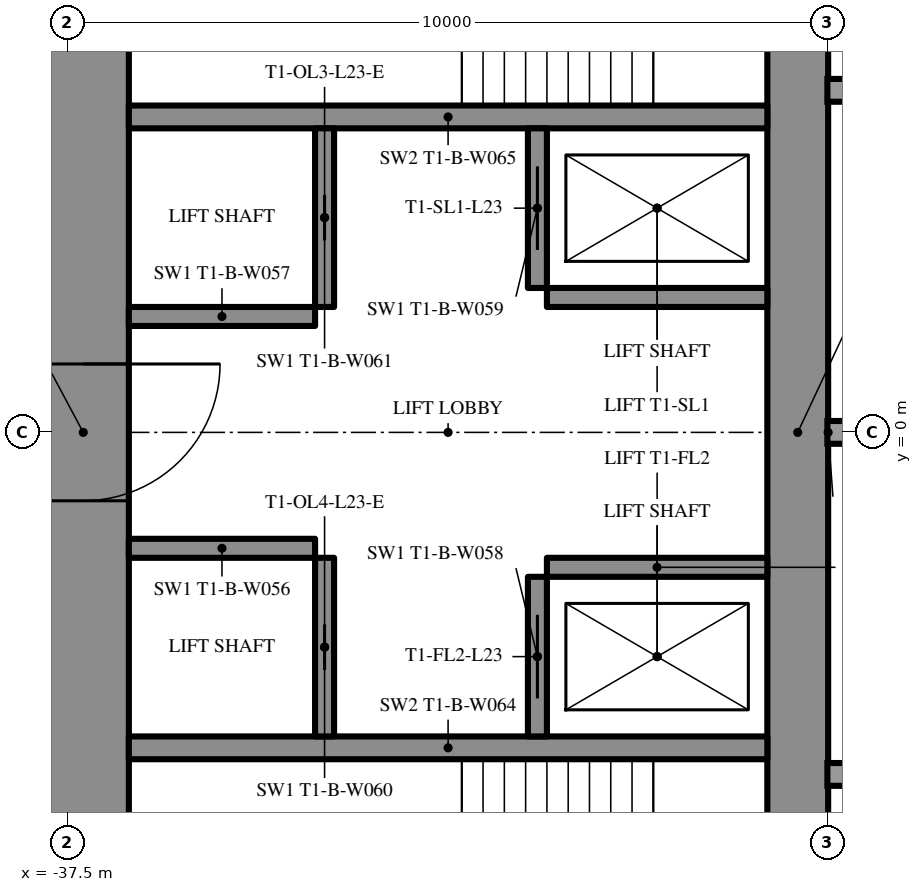
"""IFC4 building model, lengths in metres.
Left out: names, types, materials, properties, quantities, classifications, styles, units other than length and angle.
Written with IfcOpenShell. Run it as: python <this file> out.ifc"""

import sys

from ifc_helpers import new_model, si_unit, direction, frame, frame_2d, origin, place, context, subcontext, project, spatial, rectangle, extrude, element, fill, save


model = new_model("IFC4")
c1 = context("Model", 3, precision=1e-05, world=origin(), true_north=direction((0.0, 1.0)))
c2 = subcontext(c1, "Body", "Model", "MODEL_VIEW")
j1 = project(units=[si_unit("LENGTHUNIT", "METRE"), si_unit("PLANEANGLEUNIT", "RADIAN")], contexts=[c1])
p1 = place(None, origin())
s1 = spatial("IfcSite", under=j1, at=p1, CompositionType="ELEMENT")
p2 = place(p1, origin())
s2 = spatial("IfcBuilding", under=s1, at=p2, CompositionType="ELEMENT")
p3 = place(p2, frame((0.0, 0.0, 90.6)))
s3 = spatial("IfcBuildingStorey", under=s2, at=p3, CompositionType="ELEMENT", Elevation=90.6)
p4 = place(p3, frame((-27.9, 8.6, 0.0), z_axis=(0.0, 0.0, 1.0), x_axis=(0.0, -1.0, 0.0)))
e1 = element("IfcWall", 1, at=p4, inside=s3, PredefinedType="SHEAR", context=c2, shape_type="SweptSolid", body=[
    extrude(rectangle(XDim=17.2, YDim=0.8, at=frame_2d((8.6, 0.0))), origin(), (0.0, 0.0, 1.0), 3.5),
])
p5 = place(p4, frame((2.45, 0.0, 0.6)))
e2 = element("IfcOpeningElement", 2, at=p5, cuts=e1, PredefinedType="OPENING", context=c2, shape_type="SweptSolid", body=[
    extrude(rectangle(XDim=0.6, YDim=2.1, at=frame_2d((0.3, 1.05))), frame((0.0, 0.41, 0.0), z_axis=(0.0, -1.0, 0.0), x_axis=(1.0, 0.0, 0.0)), (0.0, 0.0, 1.0), 0.82),
])
p6 = place(p4, frame((14.15, 0.0, 0.6)))
e3 = element("IfcOpeningElement", 3, at=p6, cuts=e1, PredefinedType="OPENING", context=c2, shape_type="SweptSolid", body=[
    extrude(rectangle(XDim=0.6, YDim=2.1, at=frame_2d((0.3, 1.05))), frame((0.0, 0.41, 0.0), z_axis=(0.0, -1.0, 0.0), x_axis=(1.0, 0.0, 0.0)), (0.0, 0.0, 1.0), 0.82),
])
p7 = place(p3, frame((-37.3, 8.6, 0.0), z_axis=(0.0, 0.0, 1.0), x_axis=(0.0, -1.0, 0.0)))
e4 = element("IfcWall", 4, at=p7, inside=s3, PredefinedType="SHEAR", context=c2, shape_type="SweptSolid", body=[
    extrude(rectangle(XDim=17.2, YDim=1.2, at=frame_2d((8.6, 0.0))), origin(), (0.0, 0.0, 1.0), 3.5),
])
p8 = place(p7, frame((7.7, 0.0, 0.0)))
e5 = element("IfcOpeningElement", 5, at=p8, cuts=e4, PredefinedType="OPENING", context=c2, shape_type="SweptSolid", body=[
    extrude(rectangle(XDim=1.8, YDim=2.2, at=frame_2d((0.9, 1.1))), frame((0.0, 0.61, 0.0), z_axis=(0.0, -1.0, 0.0), x_axis=(1.0, 0.0, 0.0)), (0.0, 0.0, 1.0), 1.22),
])
for number, where, z_axis, x_axis in (
    (6, (-28.3, 4.15, 0.0), (0.0, 0.0, 1.0), (-1.0, 0.0, 0.0)),
    (7, (-28.3, -4.15, 0.0), (0.0, 0.0, 1.0), (-1.0, 0.0, 0.0)),
):
    element("IfcWall", number, at=place(p3, frame(where, z_axis=z_axis, x_axis=x_axis)), inside=s3, PredefinedType="SHEAR", context=c2, shape_type="SweptSolid", body=[
        extrude(rectangle(XDim=8.4, YDim=0.3, at=frame_2d((4.2, 0.0))), origin(), (0.0, 0.0, 1.0), 3.5),
    ])
p9 = place(p3, frame((-31.325, 4.0, 0.0), z_axis=(0.0, 0.0, 1.0), x_axis=(0.0, -1.0, 0.0)))
e8 = element("IfcWall", 8, at=p9, inside=s3, PredefinedType="SHEAR", context=c2, shape_type="SweptSolid", body=[
    extrude(rectangle(XDim=2.1, YDim=0.25, at=frame_2d((1.05, 0.0))), origin(), (0.0, 0.0, 1.0), 3.5),
])
p10 = place(p9, frame((0.5, 0.0, 0.0)))
e9 = element("IfcOpeningElement", 9, at=p10, cuts=e8, PredefinedType="OPENING", context=c2, shape_type="SweptSolid", body=[
    extrude(rectangle(XDim=1.1, YDim=2.2, at=frame_2d((0.55, 1.1))), frame((0.0, 0.135, 0.0), z_axis=(0.0, -1.0, 0.0), x_axis=(1.0, 0.0, 0.0)), (0.0, 0.0, 1.0), 0.27),
])
p11 = place(p3, frame((-34.125, 4.0, 0.0), z_axis=(0.0, 0.0, 1.0), x_axis=(0.0, -1.0, 0.0)))
e10 = element("IfcWall", 10, at=p11, inside=s3, PredefinedType="SHEAR", context=c2, shape_type="SweptSolid", body=[
    extrude(rectangle(XDim=2.35, YDim=0.25, at=frame_2d((1.175, 0.0))), origin(), (0.0, 0.0, 1.0), 3.5),
])
p12 = place(p11, frame((0.875, 0.0, 0.0)))
e11 = element("IfcOpeningElement", 11, at=p12, cuts=e10, PredefinedType="OPENING", context=c2, shape_type="SweptSolid", body=[
    extrude(rectangle(XDim=0.6, YDim=2.0, at=frame_2d((0.3, 1.0))), frame((0.0, 0.135, 0.0), z_axis=(0.0, -1.0, 0.0), x_axis=(1.0, 0.0, 0.0)), (0.0, 0.0, 1.0), 0.27),
])
p13 = place(p3, frame((-28.3, 1.775, 0.0), z_axis=(0.0, 0.0, 1.0), x_axis=(-1.0, 0.0, 0.0)))
e12 = element("IfcWall", 12, at=p13, inside=s3, PredefinedType="SHEAR", context=c2, shape_type="SweptSolid", body=[
    extrude(rectangle(XDim=2.9, YDim=0.25, at=frame_2d((1.45, 0.0))), origin(), (0.0, 0.0, 1.0), 3.5),
])
p14 = place(p3, frame((-34.25, 1.525, 0.0), z_axis=(0.0, 0.0, 1.0), x_axis=(-1.0, 0.0, 0.0)))
e13 = element("IfcWall", 13, at=p14, inside=s3, PredefinedType="SHEAR", context=c2, shape_type="SweptSolid", body=[
    extrude(rectangle(XDim=2.45, YDim=0.25, at=frame_2d((1.225, 0.0))), origin(), (0.0, 0.0, 1.0), 3.5),
])
p15 = place(p3, frame((-31.325, -1.9, 0.0), z_axis=(0.0, 0.0, 1.0), x_axis=(0.0, -1.0, 0.0)))
e14 = element("IfcWall", 14, at=p15, inside=s3, PredefinedType="SHEAR", context=c2, shape_type="SweptSolid", body=[
    extrude(rectangle(XDim=2.1, YDim=0.25, at=frame_2d((1.05, 0.0))), origin(), (0.0, 0.0, 1.0), 3.5),
])
p16 = place(p15, frame((0.5, 0.0, 0.0)))
e15 = element("IfcOpeningElement", 15, at=p16, cuts=e14, PredefinedType="OPENING", context=c2, shape_type="SweptSolid", body=[
    extrude(rectangle(XDim=1.1, YDim=2.2, at=frame_2d((0.55, 1.1))), frame((0.0, 0.135, 0.0), z_axis=(0.0, -1.0, 0.0), x_axis=(1.0, 0.0, 0.0)), (0.0, 0.0, 1.0), 0.27),
])
p17 = place(p3, frame((-34.125, -1.65, 0.0), z_axis=(0.0, 0.0, 1.0), x_axis=(0.0, -1.0, 0.0)))
e16 = element("IfcWall", 16, at=p17, inside=s3, PredefinedType="SHEAR", context=c2, shape_type="SweptSolid", body=[
    extrude(rectangle(XDim=2.35, YDim=0.25, at=frame_2d((1.175, 0.0))), origin(), (0.0, 0.0, 1.0), 3.5),
])
p18 = place(p17, frame((0.875, 0.0, 0.0)))
e17 = element("IfcOpeningElement", 17, at=p18, cuts=e16, PredefinedType="OPENING", context=c2, shape_type="SweptSolid", body=[
    extrude(rectangle(XDim=0.6, YDim=2.0, at=frame_2d((0.3, 1.0))), frame((0.0, 0.135, 0.0), z_axis=(0.0, -1.0, 0.0), x_axis=(1.0, 0.0, 0.0)), (0.0, 0.0, 1.0), 0.27),
])
p19 = place(p3, frame((-28.3, -1.775, 0.0), z_axis=(0.0, 0.0, 1.0), x_axis=(-1.0, 0.0, 0.0)))
e18 = element("IfcWall", 18, at=p19, inside=s3, PredefinedType="SHEAR", context=c2, shape_type="SweptSolid", body=[
    extrude(rectangle(XDim=2.9, YDim=0.25, at=frame_2d((1.45, 0.0))), origin(), (0.0, 0.0, 1.0), 3.5),
])
p20 = place(p3, frame((-34.25, -1.525, 0.0), z_axis=(0.0, 0.0, 1.0), x_axis=(-1.0, 0.0, 0.0)))
e19 = element("IfcWall", 19, at=p20, inside=s3, PredefinedType="SHEAR", context=c2, shape_type="SweptSolid", body=[
    extrude(rectangle(XDim=2.45, YDim=0.25, at=frame_2d((1.225, 0.0))), origin(), (0.0, 0.0, 1.0), 3.5),
])
p21 = place(p3, frame((-27.2, 14.3, 0.0), z_axis=(0.0, 0.0, 1.0), x_axis=(-0.866026593062, -0.499997940104, 0.0)))
e20 = element("IfcWall", 20, at=p21, inside=s3, PredefinedType="SHEAR", context=c2, shape_type="SweptSolid", body=[
    extrude(rectangle(XDim=28.946, YDim=1.2, at=frame_2d((14.473, 0.0))), origin(), (0.0, 0.0, 1.0), 3.5),
])
p22 = place(p21, frame((4.6, 0.0, 0.0)))
e21 = element("IfcOpeningElement", 21, at=p22, cuts=e20, PredefinedType="OPENING", context=c2, shape_type="SweptSolid", body=[
    extrude(rectangle(XDim=1.0, YDim=2.2, at=frame_2d((0.5, 1.1))), frame((0.0, 0.61, 0.0), z_axis=(0.0, -1.0, 0.0), x_axis=(1.0, 0.0, 0.0)), (0.0, 0.0, 1.0), 1.22),
])
p23 = place(p21, frame((13.395, 0.0, 0.0)))
e22 = element("IfcOpeningElement", 22, at=p23, cuts=e20, PredefinedType="OPENING", context=c2, shape_type="SweptSolid", body=[
    extrude(rectangle(XDim=1.8, YDim=2.2, at=frame_2d((0.9, 1.1))), frame((0.0, 0.61, 0.0), z_axis=(0.0, -1.0, 0.0), x_axis=(1.0, 0.0, 0.0)), (0.0, 0.0, 1.0), 1.22),
])
p24 = place(p3, frame((-27.2, -14.3, 0.0), z_axis=(0.0, 0.0, 1.0), x_axis=(-0.866024021859, 0.500002393557, 0.0)))
e23 = element("IfcWall", 23, at=p24, inside=s3, PredefinedType="SHEAR", context=c2, shape_type="SweptSolid", body=[
    extrude(rectangle(XDim=27.907, YDim=1.2, at=frame_2d((13.954, 0.0))), origin(), (0.0, 0.0, 1.0), 3.5),
])
p25 = place(p24, frame((4.6, 0.0, 0.0)))
e24 = element("IfcOpeningElement", 24, at=p25, cuts=e23, PredefinedType="OPENING", context=c2, shape_type="SweptSolid", body=[
    extrude(rectangle(XDim=1.0, YDim=2.2, at=frame_2d((0.5, 1.1))), frame((0.0, 0.61, 0.0), z_axis=(0.0, -1.0, 0.0), x_axis=(1.0, 0.0, 0.0)), (0.0, 0.0, 1.0), 1.22),
])
p26 = place(p24, frame((13.395, 0.0, 0.0)))
e25 = element("IfcOpeningElement", 25, at=p26, cuts=e23, PredefinedType="OPENING", context=c2, shape_type="SweptSolid", body=[
    extrude(rectangle(XDim=1.8, YDim=2.2, at=frame_2d((0.9, 1.1))), frame((0.0, 0.61, 0.0), z_axis=(0.0, -1.0, 0.0), x_axis=(1.0, 0.0, 0.0)), (0.0, 0.0, 1.0), 1.22),
])
p27 = place(p3, frame((-37.7, 10.894, 0.0), z_axis=(0.0, 0.0, 1.0), x_axis=(-0.866027905338, -0.499995667157, 0.0)))
e26 = element("IfcWall", 26, at=p27, inside=s3, PredefinedType="PARTITIONING", context=c2, shape_type="SweptSolid", body=[
    extrude(rectangle(XDim=21.787, YDim=0.2, at=frame_2d((10.894, 0.0))), origin(), (0.0, 0.0, 1.0), 3.25),
])
p28 = place(p27, frame((17.887, 0.0, 0.0)))
e27 = element("IfcOpeningElement", 27, at=p28, cuts=e26, PredefinedType="OPENING", context=c2, shape_type="SweptSolid", body=[
    extrude(rectangle(XDim=0.95, YDim=2.2, at=frame_2d((0.475, 1.1))), frame((0.0, 0.11, 0.0), z_axis=(0.0, -1.0, 0.0), x_axis=(1.0, 0.0, 0.0)), (0.0, 0.0, 1.0), 0.22),
])
p29 = place(p27, frame((9.531, 0.0, 0.0)))
e28 = element("IfcOpeningElement", 28, at=p29, cuts=e26, PredefinedType="OPENING", context=c2, shape_type="SweptSolid", body=[
    extrude(rectangle(XDim=0.95, YDim=2.2, at=frame_2d((0.475, 1.1))), frame((0.0, 0.11, 0.0), z_axis=(0.0, -1.0, 0.0), x_axis=(1.0, 0.0, 0.0)), (0.0, 0.0, 1.0), 0.22),
])
p30 = place(p3, frame((-36.92, -11.344, 0.0), z_axis=(0.0, 0.0, 1.0), x_axis=(-0.866028313256, 0.499994960614, 0.0)))
e29 = element("IfcWall", 29, at=p30, inside=s3, PredefinedType="PARTITIONING", context=c2, shape_type="SweptSolid", body=[
    extrude(rectangle(XDim=22.568, YDim=0.2, at=frame_2d((11.284, 0.0))), origin(), (0.0, 0.0, 1.0), 3.25),
])
p31 = place(p30, frame((14.481, 0.0, 0.0)))
e30 = element("IfcOpeningElement", 30, at=p31, cuts=e29, PredefinedType="OPENING", context=c2, shape_type="SweptSolid", body=[
    extrude(rectangle(XDim=0.95, YDim=2.2, at=frame_2d((0.475, 1.1))), frame((0.0, 0.11, 0.0), z_axis=(0.0, -1.0, 0.0), x_axis=(1.0, 0.0, 0.0)), (0.0, 0.0, 1.0), 0.22),
])
p32 = place(p30, frame((3.35, 0.0, 0.0)))
e31 = element("IfcOpeningElement", 31, at=p32, cuts=e29, PredefinedType="OPENING", context=c2, shape_type="SweptSolid", body=[
    extrude(rectangle(XDim=1.0, YDim=2.2, at=frame_2d((0.5, 1.1))), frame((0.0, 0.11, 0.0), z_axis=(0.0, -1.0, 0.0), x_axis=(1.0, 0.0, 0.0)), (0.0, 0.0, 1.0), 0.22),
])
p33 = place(p8, origin())
e32 = element("IfcDoor", 32, at=p33, inside=s3, OperationType="DOUBLE_DOOR_SINGLE_SWING", PredefinedType="DOOR", context=c2, shape_type="SweptSolid", body=[
    extrude(rectangle(XDim=1.8, YDim=2.2, at=frame_2d((0.9, 1.1))), frame((0.0, 0.025, 0.0), z_axis=(0.0, -1.0, 0.0), x_axis=(1.0, 0.0, 0.0)), (0.0, 0.0, 1.0), 0.05),
])
fill(e5, e32)
p34 = place(p10, origin())
e33 = element("IfcDoor", 33, at=p34, inside=s3, OperationType="SLIDING_TO_LEFT", PredefinedType="USERDEFINED", context=c2, shape_type="SweptSolid", body=[
    extrude(rectangle(XDim=1.1, YDim=2.2, at=frame_2d((0.55, 1.1))), frame((0.0, 0.025, 0.0), z_axis=(0.0, -1.0, 0.0), x_axis=(1.0, 0.0, 0.0)), (0.0, 0.0, 1.0), 0.05),
])
fill(e9, e33)
p35 = place(p16, origin())
e34 = element("IfcDoor", 34, at=p35, inside=s3, OperationType="SLIDING_TO_LEFT", PredefinedType="USERDEFINED", context=c2, shape_type="SweptSolid", body=[
    extrude(rectangle(XDim=1.1, YDim=2.2, at=frame_2d((0.55, 1.1))), frame((0.0, 0.025, 0.0), z_axis=(0.0, -1.0, 0.0), x_axis=(1.0, 0.0, 0.0)), (0.0, 0.0, 1.0), 0.05),
])
fill(e15, e34)
p36 = place(p12, origin())
e35 = element("IfcDoor", 35, at=p36, inside=s3, OperationType="SLIDING_TO_LEFT", PredefinedType="DOOR", context=c2, shape_type="SweptSolid", body=[
    extrude(rectangle(XDim=0.6, YDim=2.0, at=frame_2d((0.3, 1.0))), frame((0.0, 0.025, 0.0), z_axis=(0.0, -1.0, 0.0), x_axis=(1.0, 0.0, 0.0)), (0.0, 0.0, 1.0), 0.05),
])
fill(e11, e35)
p37 = place(p18, origin())
e36 = element("IfcDoor", 36, at=p37, inside=s3, OperationType="SLIDING_TO_LEFT", PredefinedType="DOOR", context=c2, shape_type="SweptSolid", body=[
    extrude(rectangle(XDim=0.6, YDim=2.0, at=frame_2d((0.3, 1.0))), frame((0.0, 0.025, 0.0), z_axis=(0.0, -1.0, 0.0), x_axis=(1.0, 0.0, 0.0)), (0.0, 0.0, 1.0), 0.05),
])
fill(e17, e36)
save(model, sys.argv[1])
